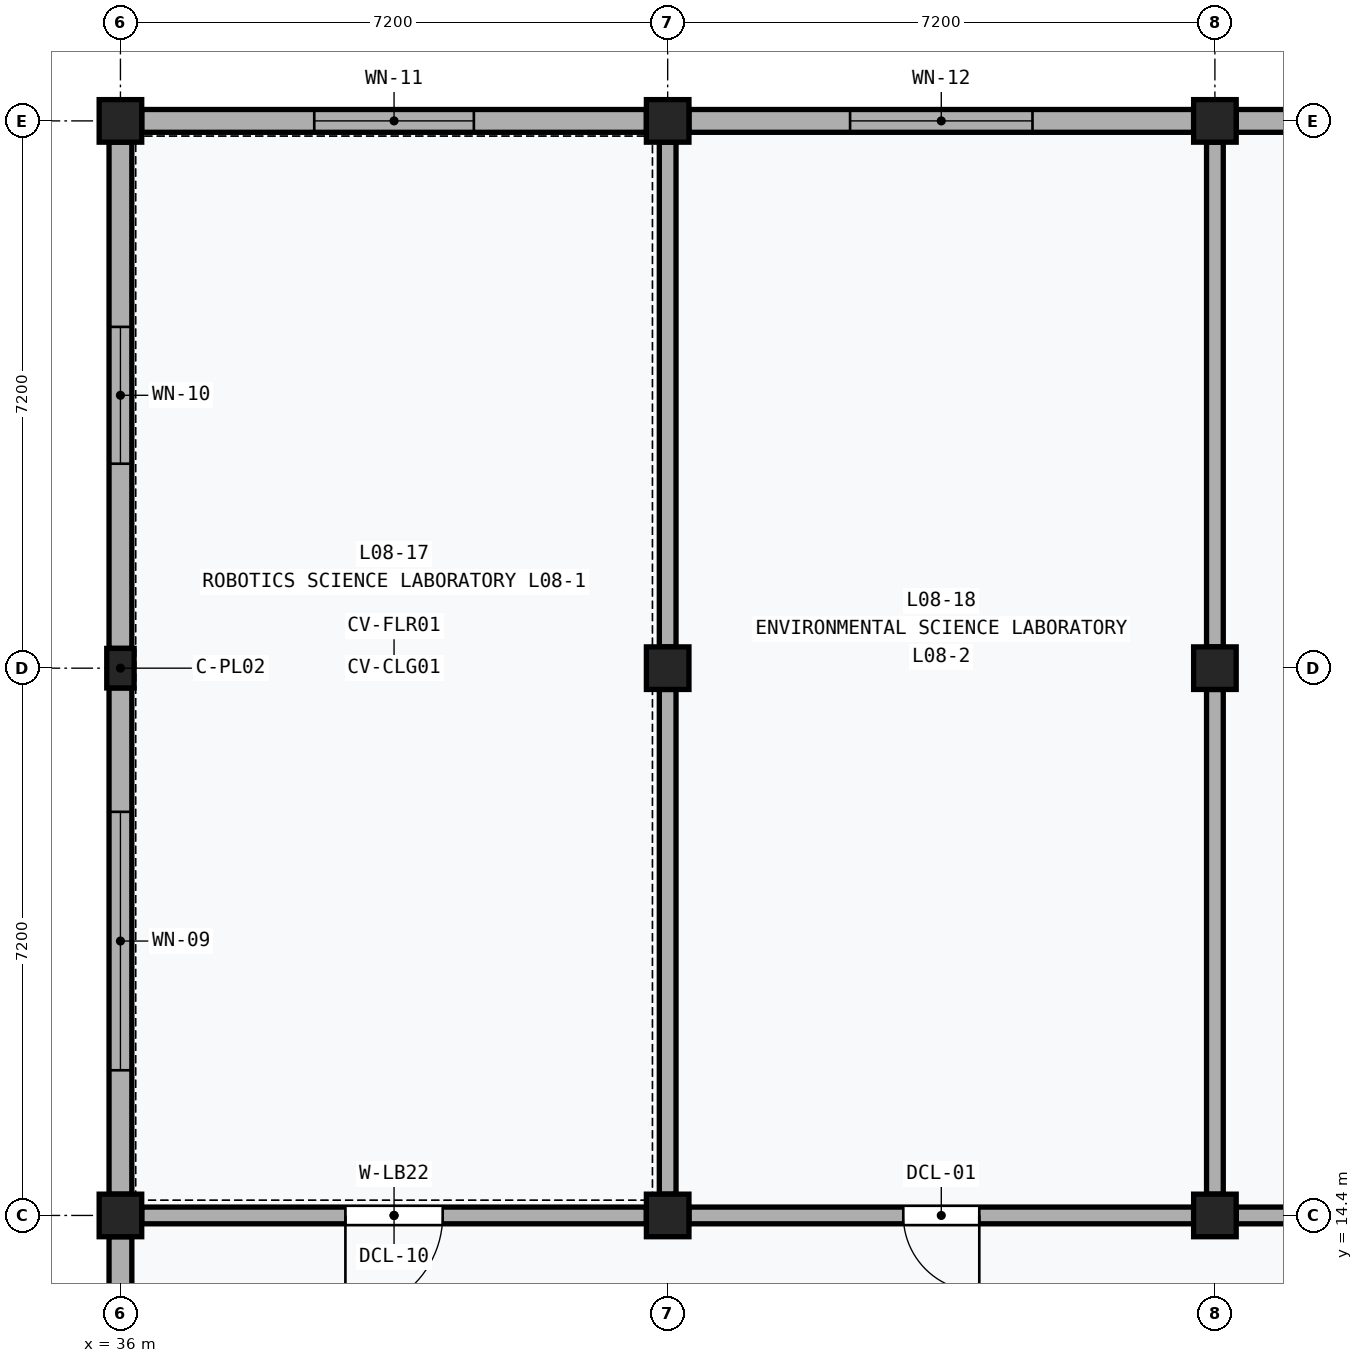
"""IFC4 building model, lengths in metres.
Left out: names, types, materials, properties, quantities, classifications, styles, units other than length and angle.
Written with IfcOpenShell. Run it as: python <this file> out.ifc"""

import sys

from ifc_helpers import new_model, si_unit, direction, frame, frame_2d, origin, origin_2d, place, context, subcontext, project, spatial, rectangle, extrude, element, fill, save


model = new_model("IFC4")
c1 = context("Model", 3, precision=1e-05, world=origin(), true_north=direction((0.0, 1.0)))
c2 = subcontext(c1, "Body", "Model", "MODEL_VIEW")
j1 = project(units=[si_unit("LENGTHUNIT", "METRE"), si_unit("PLANEANGLEUNIT", "RADIAN")], contexts=[c1])
p1 = place(None, origin())
s1 = spatial("IfcSite", under=j1, at=p1, CompositionType="ELEMENT")
p2 = place(p1, origin())
s2 = spatial("IfcBuilding", under=s1, at=p2, CompositionType="ELEMENT")
p3 = place(p2, frame((0.0, 0.0, 34.8)))
s3 = spatial("IfcBuildingStorey", under=s2, at=p3, CompositionType="ELEMENT", Elevation=34.8)
p4 = place(p3, frame((36.0, 14.4, 0.0), z_axis=(0.0, 0.0, 1.0), x_axis=(1.0, 0.0, 0.0)))
e1 = element("IfcColumn", 1, at=p4, inside=s3, PredefinedType="COLUMN", context=c2, shape_type="SweptSolid", body=[
    extrude(rectangle(XDim=0.56, YDim=0.56, at=origin_2d()), origin(), (0.0, 0.0, 1.0), 4.0),
])
p5 = place(p3, frame((36.0, 21.6, 0.0), z_axis=(0.0, 0.0, 1.0), x_axis=(1.0, 0.0, 0.0)))
e2 = element("IfcColumn", 2, at=p5, inside=s3, PredefinedType="PILASTER", context=c2, shape_type="SweptSolid", body=[
    extrude(rectangle(XDim=0.36, YDim=0.52, at=origin_2d()), origin(), (0.0, 0.0, 1.0), 4.0),
])
for number, where, z_axis, x_axis in (
    (3, (36.0, 28.8, 0.0), (0.0, 0.0, 1.0), (1.0, 0.0, 0.0)),
    (4, (43.2, 14.4, 0.0), (0.0, 0.0, 1.0), (1.0, 0.0, 0.0)),
    (5, (43.2, 21.6, 0.0), (0.0, 0.0, 1.0), (1.0, 0.0, 0.0)),
    (6, (43.2, 28.8, 0.0), (0.0, 0.0, 1.0), (1.0, 0.0, 0.0)),
    (7, (50.4, 14.4, 0.0), (0.0, 0.0, 1.0), (1.0, 0.0, 0.0)),
    (8, (50.4, 21.6, 0.0), (0.0, 0.0, 1.0), (1.0, 0.0, 0.0)),
    (9, (50.4, 28.8, 0.0), (0.0, 0.0, 1.0), (1.0, 0.0, 0.0)),
):
    element("IfcColumn", number, at=place(p3, frame(where, z_axis=z_axis, x_axis=x_axis)), inside=s3, PredefinedType="COLUMN", context=c2, shape_type="SweptSolid", body=[
        extrude(rectangle(XDim=0.56, YDim=0.56, at=origin_2d()), origin(), (0.0, 0.0, 1.0), 4.0),
    ])
p6 = place(p3, frame((36.0, 7.48, 0.0), z_axis=(0.0, 0.0, 1.0), x_axis=(0.0, 1.0, 0.0)))
e10 = element("IfcWall", 10, at=p6, inside=s3, PredefinedType="SOLIDWALL", context=c2, shape_type="SweptSolid", body=[
    extrude(rectangle(XDim=6.64, YDim=0.3, at=frame_2d((3.32, 0.0))), origin(), (0.0, 0.0, 1.0), 3.19),
])
p7 = place(p6, frame((1.72, 0.0, 0.9)))
e11 = element("IfcOpeningElement", 11, at=p7, cuts=e10, PredefinedType="OPENING", context=c2, shape_type="SweptSolid", body=[
    extrude(rectangle(XDim=3.2, YDim=1.8, at=frame_2d((1.6, 0.9))), frame((0.0, 0.162, 0.0), z_axis=(0.0, -1.0, 0.0), x_axis=(1.0, 0.0, 0.0)), (0.0, 0.0, 1.0), 0.324),
])
p8 = place(p3, frame((36.0, 14.68, 0.0), z_axis=(0.0, 0.0, 1.0), x_axis=(0.0, 1.0, 0.0)))
e12 = element("IfcWall", 12, at=p8, inside=s3, PredefinedType="SOLIDWALL", context=c2, shape_type="SweptSolid", body=[
    extrude(rectangle(XDim=6.66, YDim=0.3, at=frame_2d((3.33, 0.0))), origin(), (0.0, 0.0, 1.0), 3.19),
])
p9 = place(p8, frame((1.63, 0.0, 0.9)))
e13 = element("IfcOpeningElement", 13, at=p9, cuts=e12, PredefinedType="OPENING", context=c2, shape_type="SweptSolid", body=[
    extrude(rectangle(XDim=3.4, YDim=1.8, at=frame_2d((1.7, 0.9))), frame((0.0, 0.162, 0.0), z_axis=(0.0, -1.0, 0.0), x_axis=(1.0, 0.0, 0.0)), (0.0, 0.0, 1.0), 0.324),
])
p10 = place(p3, frame((36.28, 28.8, 0.0), z_axis=(0.0, 0.0, 1.0), x_axis=(1.0, 0.0, 0.0)))
e14 = element("IfcWall", 14, at=p10, inside=s3, PredefinedType="SOLIDWALL", context=c2, shape_type="SweptSolid", body=[
    extrude(rectangle(XDim=6.64, YDim=0.3, at=frame_2d((3.32, 0.0))), origin(), (0.0, 0.0, 1.0), 3.19),
])
p11 = place(p10, frame((2.27, 0.0, 0.85)))
e15 = element("IfcOpeningElement", 15, at=p11, cuts=e14, PredefinedType="OPENING", context=c2, shape_type="SweptSolid", body=[
    extrude(rectangle(XDim=2.1, YDim=2.0, at=frame_2d((1.05, 1.0))), frame((0.0, 0.162, 0.0), z_axis=(0.0, -1.0, 0.0), x_axis=(1.0, 0.0, 0.0)), (0.0, 0.0, 1.0), 0.324),
])
p12 = place(p3, frame((36.0, 21.86, 0.0), z_axis=(0.0, 0.0, 1.0), x_axis=(0.0, 1.0, 0.0)))
e16 = element("IfcWall", 16, at=p12, inside=s3, PredefinedType="SOLIDWALL", context=c2, shape_type="SweptSolid", body=[
    extrude(rectangle(XDim=6.66, YDim=0.3, at=frame_2d((3.33, 0.0))), origin(), (0.0, 0.0, 1.0), 3.19),
])
p13 = place(p12, frame((2.43, 0.0, 0.85)))
e17 = element("IfcOpeningElement", 17, at=p13, cuts=e16, PredefinedType="OPENING", context=c2, shape_type="SweptSolid", body=[
    extrude(rectangle(XDim=1.8, YDim=2.0, at=frame_2d((0.9, 1.0))), frame((0.0, 0.162, 0.0), z_axis=(0.0, -1.0, 0.0), x_axis=(1.0, 0.0, 0.0)), (0.0, 0.0, 1.0), 0.324),
])
p14 = place(p3, frame((43.48, 28.8, 0.0), z_axis=(0.0, 0.0, 1.0), x_axis=(1.0, 0.0, 0.0)))
e18 = element("IfcWall", 18, at=p14, inside=s3, PredefinedType="SOLIDWALL", context=c2, shape_type="SweptSolid", body=[
    extrude(rectangle(XDim=6.64, YDim=0.3, at=frame_2d((3.32, 0.0))), origin(), (0.0, 0.0, 1.0), 3.19),
])
p15 = place(p14, frame((2.12, 0.0, 0.85)))
e19 = element("IfcOpeningElement", 19, at=p15, cuts=e18, PredefinedType="OPENING", context=c2, shape_type="SweptSolid", body=[
    extrude(rectangle(XDim=2.4, YDim=2.0, at=frame_2d((1.2, 1.0))), frame((0.0, 0.162, 0.0), z_axis=(0.0, -1.0, 0.0), x_axis=(1.0, 0.0, 0.0)), (0.0, 0.0, 1.0), 0.324),
])
p16 = place(p3, frame((50.68, 28.8, 0.0), z_axis=(0.0, 0.0, 1.0), x_axis=(1.0, 0.0, 0.0)))
e20 = element("IfcWall", 20, at=p16, inside=s3, PredefinedType="SOLIDWALL", context=c2, shape_type="SweptSolid", body=[
    extrude(rectangle(XDim=6.74, YDim=0.3, at=frame_2d((3.37, 0.0))), origin(), (0.0, 0.0, 1.0), 3.19),
])
p17 = place(p16, frame((2.02, 0.0, 0.85)))
e21 = element("IfcOpeningElement", 21, at=p17, cuts=e20, PredefinedType="OPENING", context=c2, shape_type="SweptSolid", body=[
    extrude(rectangle(XDim=2.7, YDim=2.0, at=frame_2d((1.35, 1.0))), frame((0.0, 0.162, 0.0), z_axis=(0.0, -1.0, 0.0), x_axis=(1.0, 0.0, 0.0)), (0.0, 0.0, 1.0), 0.324),
])
p18 = place(p3, frame((36.28, 14.4, 0.0), z_axis=(0.0, 0.0, 1.0), x_axis=(1.0, 0.0, 0.0)))
e22 = element("IfcWall", 22, at=p18, inside=s3, PredefinedType="PARTITIONING", context=c2, shape_type="SweptSolid", body=[
    extrude(rectangle(XDim=6.64, YDim=0.22, at=frame_2d((3.32, 0.0))), origin(), (0.0, 0.0, 1.0), 3.03),
])
p19 = place(p18, frame((2.68, 0.0, 0.0)))
e23 = element("IfcOpeningElement", 23, at=p19, cuts=e22, PredefinedType="OPENING", context=c2, shape_type="SweptSolid", body=[
    extrude(rectangle(XDim=1.28, YDim=2.28, at=frame_2d((0.64, 1.14))), frame((0.0, 0.122, 0.0), z_axis=(0.0, -1.0, 0.0), x_axis=(1.0, 0.0, 0.0)), (0.0, 0.0, 1.0), 0.244),
])
for number, where, z_axis, x_axis in (
    (24, (43.2, 14.68, 0.0), (0.0, 0.0, 1.0), (0.0, 1.0, 0.0)),
    (25, (43.2, 21.88, 0.0), (0.0, 0.0, 1.0), (0.0, 1.0, 0.0)),
):
    element("IfcWall", number, at=place(p3, frame(where, z_axis=z_axis, x_axis=x_axis)), inside=s3, PredefinedType="PARTITIONING", context=c2, shape_type="SweptSolid", body=[
        extrude(rectangle(XDim=6.64, YDim=0.22, at=frame_2d((3.32, 0.0))), origin(), (0.0, 0.0, 1.0), 3.03),
    ])
p20 = place(p3, frame((43.48, 14.4, 0.0), z_axis=(0.0, 0.0, 1.0), x_axis=(1.0, 0.0, 0.0)))
e26 = element("IfcWall", 26, at=p20, inside=s3, PredefinedType="PARTITIONING", context=c2, shape_type="SweptSolid", body=[
    extrude(rectangle(XDim=6.64, YDim=0.22, at=frame_2d((3.32, 0.0))), origin(), (0.0, 0.0, 1.0), 3.03),
])
p21 = place(p20, frame((2.82, 0.0, 0.0)))
e27 = element("IfcOpeningElement", 27, at=p21, cuts=e26, PredefinedType="OPENING", context=c2, shape_type="SweptSolid", body=[
    extrude(rectangle(XDim=1.0, YDim=2.1, at=frame_2d((0.5, 1.05))), frame((0.0, 0.122, 0.0), z_axis=(0.0, -1.0, 0.0), x_axis=(1.0, 0.0, 0.0)), (0.0, 0.0, 1.0), 0.244),
])
for number, where, z_axis, x_axis in (
    (28, (50.4, 14.68, 0.0), (0.0, 0.0, 1.0), (0.0, 1.0, 0.0)),
    (29, (50.4, 21.88, 0.0), (0.0, 0.0, 1.0), (0.0, 1.0, 0.0)),
):
    element("IfcWall", number, at=place(p3, frame(where, z_axis=z_axis, x_axis=x_axis)), inside=s3, PredefinedType="PARTITIONING", context=c2, shape_type="SweptSolid", body=[
        extrude(rectangle(XDim=6.64, YDim=0.22, at=frame_2d((3.32, 0.0))), origin(), (0.0, 0.0, 1.0), 3.03),
    ])
p22 = place(p3, frame((50.68, 14.4, 0.0), z_axis=(0.0, 0.0, 1.0), x_axis=(1.0, 0.0, 0.0)))
e30 = element("IfcWall", 30, at=p22, inside=s3, PredefinedType="PARTITIONING", context=c2, shape_type="SweptSolid", body=[
    extrude(rectangle(XDim=6.64, YDim=0.22, at=frame_2d((3.32, 0.0))), origin(), (0.0, 0.0, 1.0), 3.03),
])
p23 = place(p22, frame((2.81, 0.0, 0.0)))
e31 = element("IfcOpeningElement", 31, at=p23, cuts=e30, PredefinedType="OPENING", context=c2, shape_type="SweptSolid", body=[
    extrude(rectangle(XDim=1.02, YDim=2.12, at=frame_2d((0.51, 1.06))), frame((0.0, 0.122, 0.0), z_axis=(0.0, -1.0, 0.0), x_axis=(1.0, 0.0, 0.0)), (0.0, 0.0, 1.0), 0.244),
])
p24 = place(p9, origin())
e32 = element("IfcWindow", 32, at=p24, inside=s3, PartitioningType="SINGLE_PANEL", PredefinedType="WINDOW", context=c2, shape_type="SweptSolid", body=[
    extrude(rectangle(XDim=3.4, YDim=1.8, at=frame_2d((1.7, 0.9))), frame((0.0, 0.03, 0.0), z_axis=(0.0, -1.0, 0.0), x_axis=(1.0, 0.0, 0.0)), (0.0, 0.0, 1.0), 0.06),
])
fill(e13, e32)
p25 = place(p11, origin())
e33 = element("IfcWindow", 33, at=p25, inside=s3, PartitioningType="SINGLE_PANEL", PredefinedType="WINDOW", context=c2, shape_type="SweptSolid", body=[
    extrude(rectangle(XDim=2.1, YDim=2.0, at=frame_2d((1.05, 1.0))), frame((0.0, 0.03, 0.0), z_axis=(0.0, -1.0, 0.0), x_axis=(1.0, 0.0, 0.0)), (0.0, 0.0, 1.0), 0.06),
])
fill(e15, e33)
p26 = place(p13, origin())
e34 = element("IfcWindow", 34, at=p26, inside=s3, PartitioningType="SINGLE_PANEL", PredefinedType="WINDOW", context=c2, shape_type="SweptSolid", body=[
    extrude(rectangle(XDim=1.8, YDim=2.0, at=frame_2d((0.9, 1.0))), frame((0.0, 0.03, 0.0), z_axis=(0.0, -1.0, 0.0), x_axis=(1.0, 0.0, 0.0)), (0.0, 0.0, 1.0), 0.06),
])
fill(e17, e34)
p27 = place(p15, origin())
e35 = element("IfcWindow", 35, at=p27, inside=s3, PartitioningType="SINGLE_PANEL", PredefinedType="WINDOW", context=c2, shape_type="SweptSolid", body=[
    extrude(rectangle(XDim=2.4, YDim=2.0, at=frame_2d((1.2, 1.0))), frame((0.0, 0.03, 0.0), z_axis=(0.0, -1.0, 0.0), x_axis=(1.0, 0.0, 0.0)), (0.0, 0.0, 1.0), 0.06),
])
fill(e19, e35)
p28 = place(p19, frame((1.28, 0.0, 0.0), z_axis=(0.0, 0.0, 1.0), x_axis=(-1.0, 0.0, 0.0)))
e36 = element("IfcDoor", 36, at=p28, inside=s3, OperationType="SINGLE_SWING_RIGHT", PredefinedType="DOOR", context=c2, shape_type="SweptSolid", body=[
    extrude(rectangle(XDim=1.28, YDim=2.28, at=frame_2d((0.64, 1.14))), frame((0.0, 0.025, 0.0), z_axis=(0.0, -1.0, 0.0), x_axis=(1.0, 0.0, 0.0)), (0.0, 0.0, 1.0), 0.05),
])
fill(e23, e36)
p29 = place(p21, frame((1.0, 0.0, 0.0), z_axis=(0.0, 0.0, 1.0), x_axis=(-1.0, 0.0, 0.0)))
e37 = element("IfcDoor", 37, at=p29, inside=s3, OperationType="SINGLE_SWING_LEFT", PredefinedType="DOOR", context=c2, shape_type="SweptSolid", body=[
    extrude(rectangle(XDim=1.0, YDim=2.1, at=frame_2d((0.5, 1.05))), frame((0.0, 0.025, 0.0), z_axis=(0.0, -1.0, 0.0), x_axis=(1.0, 0.0, 0.0)), (0.0, 0.0, 1.0), 0.05),
])
fill(e27, e37)
save(model, sys.argv[1])
